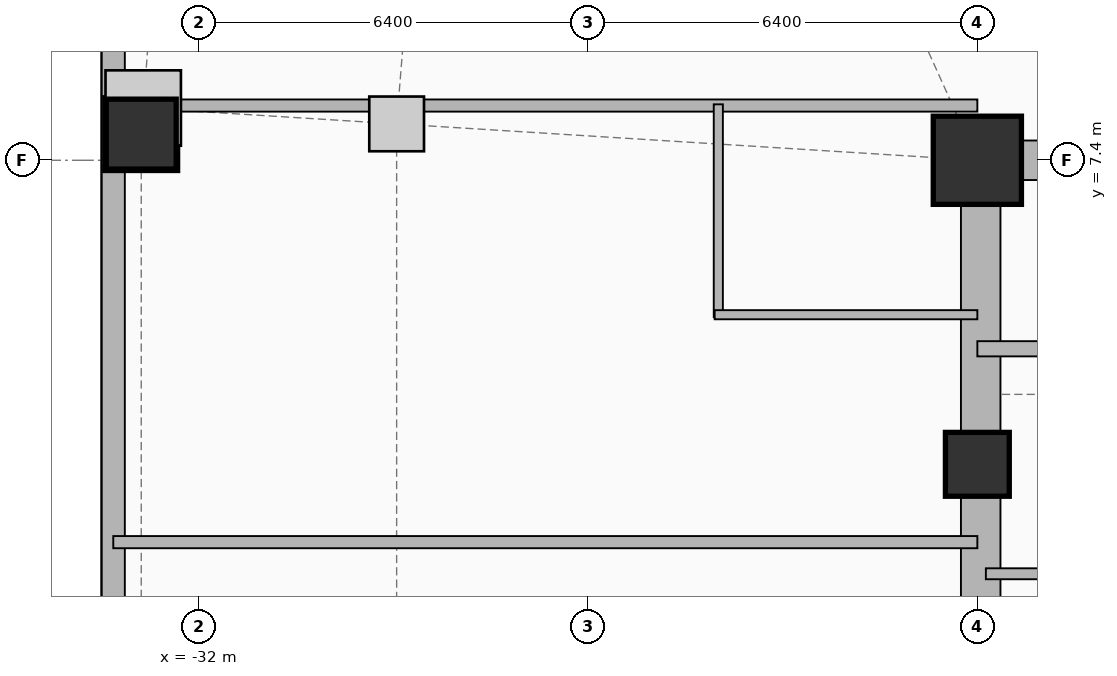
"""IFC4 building model, lengths in metres.
Left out: names, types, materials, properties, quantities, classifications, styles, units other than length and angle.
Written with IfcOpenShell. Run it as: python <this file> out.ifc"""

import sys

from ifc_helpers import new_model, si_unit, direction, frame, frame_2d, origin, origin_2d, place, context, subcontext, project, spatial, rectangle, hollow_rectangle, extrude, element, fill, save


model = new_model("IFC4")
c1 = context("Model", 3, precision=1e-05, world=origin(), true_north=direction((0.0, 1.0)))
c2 = subcontext(c1, "Body", "Model", "MODEL_VIEW")
j1 = project(units=[si_unit("LENGTHUNIT", "METRE"), si_unit("PLANEANGLEUNIT", "RADIAN")], contexts=[c1])
p1 = place(None, origin())
s1 = spatial("IfcSite", under=j1, at=p1, CompositionType="ELEMENT")
p2 = place(p1, origin())
s2 = spatial("IfcBuilding", under=s1, at=p2, CompositionType="ELEMENT")
p3 = place(p2, frame((0.0, 0.0, 80.6)))
s3 = spatial("IfcBuildingStorey", under=s2, at=p3, CompositionType="ELEMENT", Elevation=80.6)
p4 = place(p3, frame((-19.2, 2.4, 0.0), z_axis=(0.0, 0.0, 1.0), x_axis=(1.0, 0.0, 0.0)))
e1 = element("IfcColumn", 1, at=p4, inside=s3, PredefinedType="COLUMN", context=c2, shape_type="SweptSolid", body=[
    extrude(rectangle(XDim=1.05, YDim=1.05, at=origin_2d()), origin(), (0.0, 0.0, 1.0), 5.2),
])
p5 = place(p3, frame((-19.2, 7.4, 0.0), z_axis=(0.0, 0.0, 1.0), x_axis=(1.0, 0.0, 0.0)))
e2 = element("IfcColumn", 2, at=p5, inside=s3, PredefinedType="COLUMN", context=c2, shape_type="SweptSolid", body=[
    extrude(rectangle(XDim=1.45, YDim=1.45, at=origin_2d()), origin(), (0.0, 0.0, 1.0), 5.2),
])
p6 = place(p3, frame((-19.525, 7.4, 0.0), z_axis=(0.0, 0.0, 1.0), x_axis=(1.0, 0.0, 0.0)))
e3 = element("IfcWall", 3, at=p6, inside=s3, PredefinedType="SHEAR", context=c2, shape_type="SweptSolid", body=[
    extrude(rectangle(XDim=7.45, YDim=0.65, at=frame_2d((3.725, 0.0))), origin(), (0.0, 0.0, 1.0), 4.8),
])
p7 = place(p3, frame((-19.145, -7.4, 0.0), z_axis=(0.0, 0.0, 1.0), x_axis=(0.0, 1.0, 0.0)))
e4 = element("IfcWall", 4, at=p7, inside=s3, PredefinedType="SHEAR", context=c2, shape_type="SweptSolid", body=[
    extrude(rectangle(XDim=14.8, YDim=0.65, at=frame_2d((7.4, 0.0))), origin(), (0.0, 0.0, 1.0), 4.8),
])
p8 = place(p7, frame((10.6, 0.0, 0.0)))
e5 = element("IfcOpeningElement", 5, at=p8, cuts=e4, PredefinedType="OPENING", context=c2, shape_type="SweptSolid", body=[
    extrude(rectangle(XDim=0.9, YDim=2.05, at=frame_2d((0.45, 1.025))), frame((0.0, 0.335, 0.0), z_axis=(0.0, -1.0, 0.0), x_axis=(1.0, 0.0, 0.0)), (0.0, 0.0, 1.0), 0.67),
])
p9 = place(p3, frame((-32.95, 7.83, 0.0), z_axis=(0.0, 0.0, 1.0), x_axis=(1.0, 0.0, 0.0)))
e6 = element("IfcColumn", 6, at=p9, inside=s3, PredefinedType="COLUMN", context=c2, shape_type="SweptSolid", body=[
    extrude(hollow_rectangle(XDim=1.15, YDim=1.15, WallThickness=0.04, at=origin_2d()), origin(), (0.0, 0.0, 1.0), 5.165),
])
p10 = place(p3, frame((-33.41, -18.381, 0.0), z_axis=(0.0, 0.0, 1.0), x_axis=(0.0, 1.0, 0.0)))
e7 = element("IfcWall", 7, at=p10, inside=s3, PredefinedType="ELEMENTEDWALL", context=c2, shape_type="SweptSolid", body=[
    extrude(rectangle(XDim=36.763, YDim=0.38, at=frame_2d((18.381, 0.0))), origin(), (0.0, 0.0, 1.0), 3.69),
])
p11 = place(p10, frame((1.498, 0.0, 0.75)))
e8 = element("IfcOpeningElement", 8, at=p11, cuts=e7, PredefinedType="OPENING", context=c2, shape_type="SweptSolid", body=[
    extrude(rectangle(XDim=1.6, YDim=1.4, at=frame_2d((0.8, 0.7))), frame((0.0, 0.2, 0.0), z_axis=(0.0, -1.0, 0.0), x_axis=(1.0, 0.0, 0.0)), (0.0, 0.0, 1.0), 0.4),
])
p12 = place(p10, frame((6.093, 0.0, 0.75)))
e9 = element("IfcOpeningElement", 9, at=p12, cuts=e7, PredefinedType="OPENING", context=c2, shape_type="SweptSolid", body=[
    extrude(rectangle(XDim=1.6, YDim=1.4, at=frame_2d((0.8, 0.7))), frame((0.0, 0.2, 0.0), z_axis=(0.0, -1.0, 0.0), x_axis=(1.0, 0.0, 0.0)), (0.0, 0.0, 1.0), 0.4),
])
p13 = place(p10, frame((15.284, 0.0, 0.75)))
e10 = element("IfcOpeningElement", 10, at=p13, cuts=e7, PredefinedType="OPENING", context=c2, shape_type="SweptSolid", body=[
    extrude(rectangle(XDim=1.6, YDim=1.4, at=frame_2d((0.8, 0.7))), frame((0.0, 0.2, 0.0), z_axis=(0.0, -1.0, 0.0), x_axis=(1.0, 0.0, 0.0)), (0.0, 0.0, 1.0), 0.4),
])
p14 = place(p10, frame((19.879, 0.0, 0.75)))
e11 = element("IfcOpeningElement", 11, at=p14, cuts=e7, PredefinedType="OPENING", context=c2, shape_type="SweptSolid", body=[
    extrude(rectangle(XDim=1.6, YDim=1.4, at=frame_2d((0.8, 0.7))), frame((0.0, 0.2, 0.0), z_axis=(0.0, -1.0, 0.0), x_axis=(1.0, 0.0, 0.0)), (0.0, 0.0, 1.0), 0.4),
])
p15 = place(p10, frame((29.07, 0.0, 0.75)))
e12 = element("IfcOpeningElement", 12, at=p15, cuts=e7, PredefinedType="OPENING", context=c2, shape_type="SweptSolid", body=[
    extrude(rectangle(XDim=1.6, YDim=1.4, at=frame_2d((0.8, 0.7))), frame((0.0, 0.2, 0.0), z_axis=(0.0, -1.0, 0.0), x_axis=(1.0, 0.0, 0.0)), (0.0, 0.0, 1.0), 0.4),
])
p16 = place(p10, frame((33.665, 0.0, 0.75)))
e13 = element("IfcOpeningElement", 13, at=p16, cuts=e7, PredefinedType="OPENING", context=c2, shape_type="SweptSolid", body=[
    extrude(rectangle(XDim=1.6, YDim=1.4, at=frame_2d((0.8, 0.7))), frame((0.0, 0.2, 0.0), z_axis=(0.0, -1.0, 0.0), x_axis=(1.0, 0.0, 0.0)), (0.0, 0.0, 1.0), 0.4),
])
p17 = place(p3, frame((-19.2, 4.3, 0.0), z_axis=(0.0, 0.0, 1.0), x_axis=(1.0, 0.0, 0.0)))
e14 = element("IfcWall", 14, at=p17, inside=s3, PredefinedType="SOLIDWALL", context=c2, shape_type="SweptSolid", body=[
    extrude(rectangle(XDim=2.6, YDim=0.25, at=frame_2d((1.3, 0.0))), origin(), (0.0, 0.0, 1.0), 4.8),
])
p18 = place(p3, frame((-19.06, 0.6, 0.0), z_axis=(0.0, 0.0, 1.0), x_axis=(1.0, 0.0, 0.0)))
e15 = element("IfcWall", 15, at=p18, inside=s3, PredefinedType="PARTITIONING", context=c2, shape_type="SweptSolid", body=[
    extrude(rectangle(XDim=3.36, YDim=0.18, at=frame_2d((1.68, 0.0))), origin(), (0.0, 0.0, 1.0), 4.8),
])
p19 = place(p18, frame((1.155, 0.0, 0.0)))
e16 = element("IfcOpeningElement", 16, at=p19, cuts=e15, PredefinedType="OPENING", context=c2, shape_type="SweptSolid", body=[
    extrude(rectangle(XDim=1.05, YDim=2.05, at=frame_2d((0.525, 1.025))), frame((0.0, 0.1, 0.0), z_axis=(0.0, -1.0, 0.0), x_axis=(1.0, 0.0, 0.0)), (0.0, 0.0, 1.0), 0.2),
])
p20 = place(p3, frame((-33.41, 1.12, 0.0), z_axis=(0.0, 0.0, 1.0), x_axis=(1.0, 0.0, 0.0)))
e17 = element("IfcWall", 17, at=p20, inside=s3, PredefinedType="PARTITIONING", context=c2, shape_type="SweptSolid", body=[
    extrude(rectangle(XDim=14.21, YDim=0.2, at=frame_2d((7.105, 0.0))), origin(), (0.0, 0.0, 1.0), 4.8),
])
p21 = place(p3, frame((-33.41, 8.3, 0.0), z_axis=(0.0, 0.0, 1.0), x_axis=(1.0, 0.0, 0.0)))
e18 = element("IfcWall", 18, at=p21, inside=s3, PredefinedType="PARTITIONING", context=c2, shape_type="SweptSolid", body=[
    extrude(rectangle(XDim=14.21, YDim=0.2, at=frame_2d((7.105, 0.0))), origin(), (0.0, 0.0, 1.0), 3.69),
])
p22 = place(p3, frame((-23.46, 4.82, 0.0), z_axis=(0.0, 0.0, 1.0), x_axis=(0.0, 1.0, 0.0)))
e19 = element("IfcWall", 19, at=p22, inside=s3, PredefinedType="PLUMBINGWALL", context=c2, shape_type="SweptSolid", body=[
    extrude(rectangle(XDim=3.5, YDim=0.15, at=frame_2d((1.75, 0.0))), origin(), (0.0, 0.0, 1.0), 4.8),
])
p23 = place(p22, frame((1.25, 0.0, 0.0)))
e20 = element("IfcOpeningElement", 20, at=p23, cuts=e19, PredefinedType="OPENING", context=c2, shape_type="SweptSolid", body=[
    extrude(rectangle(XDim=1.0, YDim=2.05, at=frame_2d((0.5, 1.025))), frame((0.0, 0.085, 0.0), z_axis=(0.0, -1.0, 0.0), x_axis=(1.0, 0.0, 0.0)), (0.0, 0.0, 1.0), 0.17),
])
p24 = place(p3, frame((-23.52, 4.86, 0.0), z_axis=(0.0, 0.0, 1.0), x_axis=(1.0, 0.0, 0.0)))
e21 = element("IfcWall", 21, at=p24, inside=s3, PredefinedType="PLUMBINGWALL", context=c2, shape_type="SweptSolid", body=[
    extrude(rectangle(XDim=4.32, YDim=0.15, at=frame_2d((2.16, 0.0))), origin(), (0.0, 0.0, 1.0), 4.8),
])
p25 = place(p14, origin())
e22 = element("IfcWindow", 22, at=p25, inside=s3, PartitioningType="SINGLE_PANEL", PredefinedType="WINDOW", context=c2, shape_type="SweptSolid", body=[
    extrude(rectangle(XDim=1.6, YDim=1.4, at=frame_2d((0.8, 0.7))), frame((0.0, 0.03, 0.0), z_axis=(0.0, -1.0, 0.0), x_axis=(1.0, 0.0, 0.0)), (0.0, 0.0, 1.0), 0.06),
])
fill(e11, e22)
p26 = place(p23, origin())
e23 = element("IfcDoor", 23, at=p26, inside=s3, OperationType="SINGLE_SWING_LEFT", PredefinedType="DOOR", context=c2, shape_type="SweptSolid", body=[
    extrude(rectangle(XDim=1.0, YDim=2.05, at=frame_2d((0.5, 1.025))), frame((0.0, 0.025, 0.0), z_axis=(0.0, -1.0, 0.0), x_axis=(1.0, 0.0, 0.0)), (0.0, 0.0, 1.0), 0.05),
])
fill(e20, e23)
p27 = place(p8, origin())
e24 = element("IfcDoor", 24, at=p27, inside=s3, OperationType="SINGLE_SWING_LEFT", PredefinedType="DOOR", context=c2, shape_type="SweptSolid", body=[
    extrude(rectangle(XDim=0.9, YDim=2.05, at=frame_2d((0.45, 1.025))), frame((0.0, 0.025, 0.0), z_axis=(0.0, -1.0, 0.0), x_axis=(1.0, 0.0, 0.0)), (0.0, 0.0, 1.0), 0.05),
])
fill(e5, e24)
save(model, sys.argv[1])
